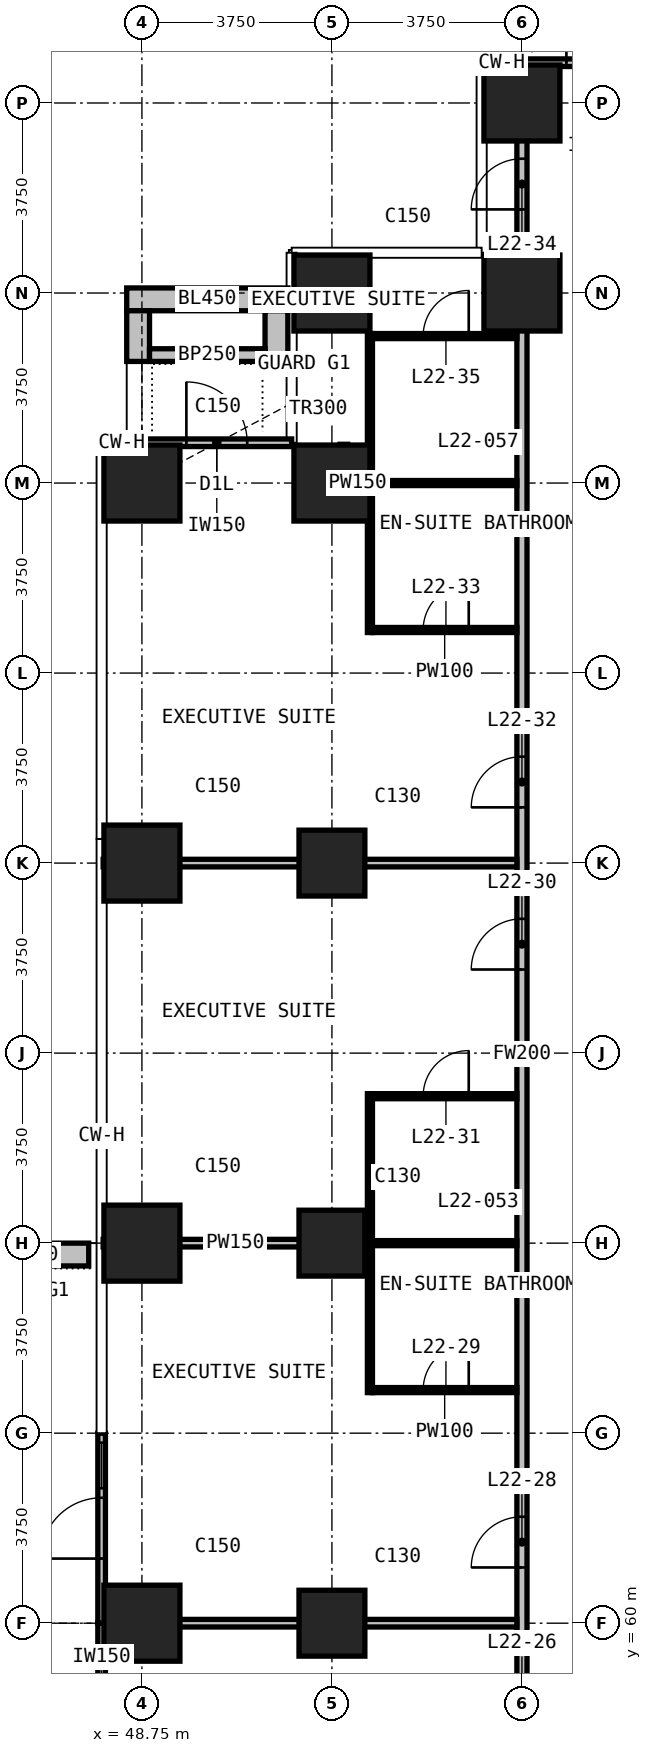
"""IFC4 building model, lengths in metres.
Left out: names, types, materials, properties, quantities, classifications, styles, units other than length and angle.
Written with IfcOpenShell. Run it as: python <this file> out.ifc"""

import sys

from ifc_helpers import new_model, si_unit, direction, frame, frame_2d, origin, origin_2d, place, context, subcontext, project, spatial, rectangle, extrude, element, fill, save


model = new_model("IFC4")
c1 = context("Model", 3, precision=1e-05, world=origin(), true_north=direction((0.0, 1.0)))
c2 = subcontext(c1, "Body", "Model", "MODEL_VIEW")
j1 = project(units=[si_unit("LENGTHUNIT", "METRE"), si_unit("PLANEANGLEUNIT", "RADIAN")], contexts=[c1])
p1 = place(None, origin())
s1 = spatial("IfcSite", under=j1, at=p1, CompositionType="ELEMENT")
p2 = place(p1, origin())
s2 = spatial("IfcBuilding", under=s1, at=p2, CompositionType="ELEMENT")
p3 = place(p2, frame((0.0, 0.0, 92.3)))
s3 = spatial("IfcBuildingStorey", under=s2, at=p3, CompositionType="ELEMENT", Elevation=92.3)
for number, where, z_axis, x_axis in (
    (1, (48.75, 60.0, 0.0), (0.0, 0.0, 1.0), (1.0, 0.0, 0.0)),
    (2, (48.75, 67.5, 0.0), (0.0, 0.0, 1.0), (1.0, 0.0, 0.0)),
    (3, (48.75, 75.0, 0.0), (0.0, 0.0, 1.0), (1.0, 0.0, 0.0)),
    (4, (48.75, 82.5, 0.0), (0.0, 0.0, 1.0), (1.0, 0.0, 0.0)),
):
    element("IfcColumn", number, at=place(p3, frame(where, z_axis=z_axis, x_axis=x_axis)), inside=s3, PredefinedType="COLUMN", context=c2, shape_type="SweptSolid", body=[
        extrude(rectangle(XDim=1.5, YDim=1.5, at=origin_2d()), origin(), (0.0, 0.0, 1.0), 3.3),
    ])
for number, where, z_axis, x_axis in (
    (5, (52.5, 60.0, 0.0), (0.0, 0.0, 1.0), (1.0, 0.0, 0.0)),
    (6, (52.5, 67.5, 0.0), (0.0, 0.0, 1.0), (1.0, 0.0, 0.0)),
    (7, (52.5, 75.0, 0.0), (0.0, 0.0, 1.0), (1.0, 0.0, 0.0)),
):
    element("IfcColumn", number, at=place(p3, frame(where, z_axis=z_axis, x_axis=x_axis)), inside=s3, PredefinedType="COLUMN", context=c2, shape_type="SweptSolid", body=[
        extrude(rectangle(XDim=1.3, YDim=1.3, at=origin_2d()), origin(), (0.0, 0.0, 1.0), 3.3),
    ])
for number, where, z_axis, x_axis in (
    (8, (52.5, 82.5, 0.0), (0.0, 0.0, 1.0), (1.0, 0.0, 0.0)),
    (9, (52.5, 86.25, 0.0), (0.0, 0.0, 1.0), (1.0, 0.0, 0.0)),
    (10, (56.25, 86.25, 0.0), (0.0, 0.0, 1.0), (1.0, 0.0, 0.0)),
    (11, (56.25, 90.0, 0.0), (0.0, 0.0, 1.0), (1.0, 0.0, 0.0)),
):
    element("IfcColumn", number, at=place(p3, frame(where, z_axis=z_axis, x_axis=x_axis)), inside=s3, PredefinedType="COLUMN", context=c2, shape_type="SweptSolid", body=[
        extrude(rectangle(XDim=1.5, YDim=1.5, at=origin_2d()), origin(), (0.0, 0.0, 1.0), 3.3),
    ])
p4 = place(p3, frame((56.25, 90.795, 0.0), z_axis=(0.0, 0.0, 1.0), x_axis=(1.0, 0.0, 0.0)))
e12 = element("IfcWall", 12, at=p4, inside=s3, PredefinedType="SOLIDWALL", context=c2, shape_type="SweptSolid", body=[
    extrude(rectangle(XDim=2.955, YDim=0.15, at=frame_2d((1.478, 0.0))), origin(), (0.0, 0.0, 1.0), 3.0),
])
p5 = place(p4, frame((0.877, 0.0, 0.0)))
e13 = element("IfcOpeningElement", 13, at=p5, cuts=e12, PredefinedType="OPENING", context=c2, shape_type="SweptSolid", body=[
    extrude(rectangle(XDim=1.2, YDim=2.4, at=frame_2d((0.6, 1.2))), frame((0.0, 0.085, 0.0), z_axis=(0.0, -1.0, 0.0), x_axis=(1.0, 0.0, 0.0)), (0.0, 0.0, 1.0), 0.17),
])
p6 = place(p3, frame((48.75, 83.295, 0.0), z_axis=(0.0, 0.0, 1.0), x_axis=(1.0, 0.0, 0.0)))
e14 = element("IfcWall", 14, at=p6, inside=s3, PredefinedType="SOLIDWALL", context=c2, shape_type="SweptSolid", body=[
    extrude(rectangle(XDim=2.955, YDim=0.15, at=frame_2d((1.478, 0.0))), origin(), (0.0, 0.0, 1.0), 3.0),
])
p7 = place(p6, frame((0.877, 0.0, 0.0)))
e15 = element("IfcOpeningElement", 15, at=p7, cuts=e14, PredefinedType="OPENING", context=c2, shape_type="SweptSolid", body=[
    extrude(rectangle(XDim=1.2, YDim=2.0, at=frame_2d((0.6, 1.0))), frame((0.0, 0.085, 0.0), z_axis=(0.0, -1.0, 0.0), x_axis=(1.0, 0.0, 0.0)), (0.0, 0.0, 1.0), 0.17),
])
p8 = place(p3, frame((47.955, 56.25, 0.0), z_axis=(0.0, 0.0, 1.0), x_axis=(0.0, 1.0, 0.0)))
e16 = element("IfcWall", 16, at=p8, inside=s3, PredefinedType="SOLIDWALL", context=c2, shape_type="SweptSolid", body=[
    extrude(rectangle(XDim=3.75, YDim=0.15, at=frame_2d((1.875, 0.0))), origin(), (0.0, 0.0, 1.0), 3.0),
])
p9 = place(p8, frame((0.188, 0.0, 0.1)))
e17 = element("IfcOpeningElement", 17, at=p9, cuts=e16, PredefinedType="OPENING", context=c2, shape_type="SweptSolid", body=[
    extrude(rectangle(XDim=0.9, YDim=2.4, at=frame_2d((0.45, 1.2))), frame((0.0, 0.085, 0.0), z_axis=(0.0, -1.0, 0.0), x_axis=(1.0, 0.0, 0.0)), (0.0, 0.0, 1.0), 0.17),
])
p10 = place(p8, frame((1.275, 0.0, 0.0)))
e18 = element("IfcOpeningElement", 18, at=p10, cuts=e16, PredefinedType="OPENING", context=c2, shape_type="SweptSolid", body=[
    extrude(rectangle(XDim=1.2, YDim=2.4, at=frame_2d((0.6, 1.2))), frame((0.0, 0.085, 0.0), z_axis=(0.0, -1.0, 0.0), x_axis=(1.0, 0.0, 0.0)), (0.0, 0.0, 1.0), 0.17),
])
p11 = place(p3, frame((47.955, 60.0, 0.0), z_axis=(0.0, 0.0, 1.0), x_axis=(0.0, 1.0, 0.0)))
e19 = element("IfcWall", 19, at=p11, inside=s3, PredefinedType="SOLIDWALL", context=c2, shape_type="SweptSolid", body=[
    extrude(rectangle(XDim=3.75, YDim=0.15, at=frame_2d((1.875, 0.0))), origin(), (0.0, 0.0, 1.0), 3.0),
])
p12 = place(p11, frame((1.275, 0.0, 0.0)))
e20 = element("IfcOpeningElement", 20, at=p12, cuts=e19, PredefinedType="OPENING", context=c2, shape_type="SweptSolid", body=[
    extrude(rectangle(XDim=1.2, YDim=2.4, at=frame_2d((0.6, 1.2))), frame((0.0, 0.085, 0.0), z_axis=(0.0, -1.0, 0.0), x_axis=(1.0, 0.0, 0.0)), (0.0, 0.0, 1.0), 0.17),
])
p13 = place(p11, frame((2.663, 0.0, 0.1)))
e21 = element("IfcOpeningElement", 21, at=p13, cuts=e19, PredefinedType="OPENING", context=c2, shape_type="SweptSolid", body=[
    extrude(rectangle(XDim=0.9, YDim=2.4, at=frame_2d((0.45, 1.2))), frame((0.0, 0.085, 0.0), z_axis=(0.0, -1.0, 0.0), x_axis=(1.0, 0.0, 0.0)), (0.0, 0.0, 1.0), 0.17),
])
p14 = place(p3, frame((48.45, 86.125, 0.0), z_axis=(0.0, 0.0, 1.0), x_axis=(1.0, 0.0, 0.0)))
e22 = element("IfcWall", 22, at=p14, inside=s3, PredefinedType="USERDEFINED", context=c2, shape_type="SweptSolid", body=[
    extrude(rectangle(XDim=3.18, YDim=0.45, at=frame_2d((1.59, 0.0))), origin(), (0.0, 0.0, 1.0), 1.1),
])
for number, where, z_axis, x_axis in (
    (23, (48.675, 84.9, 0.0), (0.0, 0.0, 1.0), (0.0, 1.0, 0.0)),
    (24, (51.405, 84.9, 0.0), (0.0, 0.0, 1.0), (0.0, 1.0, 0.0)),
):
    element("IfcWall", number, at=place(p3, frame(where, z_axis=z_axis, x_axis=x_axis)), inside=s3, PredefinedType="USERDEFINED", context=c2, shape_type="SweptSolid", body=[
        extrude(rectangle(XDim=1.0, YDim=0.45, at=frame_2d((0.5, 0.0))), origin(), (0.0, 0.0, 1.0), 1.1),
    ])
p15 = place(p3, frame((48.9, 85.025, 0.0), z_axis=(0.0, 0.0, 1.0), x_axis=(1.0, 0.0, 0.0)))
e25 = element("IfcWall", 25, at=p15, inside=s3, PredefinedType="USERDEFINED", context=c2, shape_type="SweptSolid", body=[
    extrude(rectangle(XDim=2.28, YDim=0.25, at=frame_2d((1.14, 0.0))), origin(), (0.0, 0.0, 1.0), 1.0),
])
p16 = place(p3, frame((47.7, 67.275, 0.0), z_axis=(0.0, 0.0, 1.0), x_axis=(-1.0, 0.0, 0.0)))
e26 = element("IfcWall", 26, at=p16, inside=s3, PredefinedType="USERDEFINED", context=c2, shape_type="SweptSolid", body=[
    extrude(rectangle(XDim=2.35, YDim=0.45, at=frame_2d((1.175, 0.0))), origin(), (0.0, 0.0, 1.0), 1.1),
])
p17 = place(p3, frame((56.25, 52.4, 0.0), z_axis=(0.0, 0.0, 1.0), x_axis=(0.0, 1.0, 0.0)))
e27 = element("IfcWall", 27, at=p17, inside=s3, PredefinedType="PARTITIONING", context=c2, shape_type="SweptSolid", body=[
    extrude(rectangle(XDim=37.675, YDim=0.2, at=frame_2d((18.837, 0.0))), origin(), (0.0, 0.0, 1.0), 3.0),
])
p18 = place(p17, frame((5.5, 0.0, 0.0)))
e28 = element("IfcOpeningElement", 28, at=p18, cuts=e27, PredefinedType="OPENING", context=c2, shape_type="SweptSolid", body=[
    extrude(rectangle(XDim=1.0, YDim=2.2, at=frame_2d((0.5, 1.1))), frame((0.0, 0.11, 0.0), z_axis=(0.0, -1.0, 0.0), x_axis=(1.0, 0.0, 0.0)), (0.0, 0.0, 1.0), 0.22),
])
p19 = place(p17, frame((8.7, 0.0, 0.0)))
e29 = element("IfcOpeningElement", 29, at=p19, cuts=e27, PredefinedType="OPENING", context=c2, shape_type="SweptSolid", body=[
    extrude(rectangle(XDim=1.0, YDim=2.2, at=frame_2d((0.5, 1.1))), frame((0.0, 0.11, 0.0), z_axis=(0.0, -1.0, 0.0), x_axis=(1.0, 0.0, 0.0)), (0.0, 0.0, 1.0), 0.22),
])
p20 = place(p17, frame((20.5, 0.0, 0.0)))
e30 = element("IfcOpeningElement", 30, at=p20, cuts=e27, PredefinedType="OPENING", context=c2, shape_type="SweptSolid", body=[
    extrude(rectangle(XDim=1.0, YDim=2.2, at=frame_2d((0.5, 1.1))), frame((0.0, 0.11, 0.0), z_axis=(0.0, -1.0, 0.0), x_axis=(1.0, 0.0, 0.0)), (0.0, 0.0, 1.0), 0.22),
])
p21 = place(p17, frame((23.7, 0.0, 0.0)))
e31 = element("IfcOpeningElement", 31, at=p21, cuts=e27, PredefinedType="OPENING", context=c2, shape_type="SweptSolid", body=[
    extrude(rectangle(XDim=1.0, YDim=2.2, at=frame_2d((0.5, 1.1))), frame((0.0, 0.11, 0.0), z_axis=(0.0, -1.0, 0.0), x_axis=(1.0, 0.0, 0.0)), (0.0, 0.0, 1.0), 0.22),
])
p22 = place(p17, frame((35.5, 0.0, 0.0)))
e32 = element("IfcOpeningElement", 32, at=p22, cuts=e27, PredefinedType="OPENING", context=c2, shape_type="SweptSolid", body=[
    extrude(rectangle(XDim=1.0, YDim=2.2, at=frame_2d((0.5, 1.1))), frame((0.0, 0.11, 0.0), z_axis=(0.0, -1.0, 0.0), x_axis=(1.0, 0.0, 0.0)), (0.0, 0.0, 1.0), 0.22),
])
p23 = place(p3, frame((56.25, 90.03, 0.0), z_axis=(0.0, 0.0, 1.0), x_axis=(0.0, 1.0, 0.0)))
e33 = element("IfcWall", 33, at=p23, inside=s3, PredefinedType="PARTITIONING", context=c2, shape_type="SweptSolid", body=[
    extrude(rectangle(XDim=0.615, YDim=0.2, at=frame_2d((0.308, 0.0))), origin(), (0.0, 0.0, 1.0), 3.0),
])
p24 = place(p3, frame((48.04, 60.0, 0.0), z_axis=(0.0, 0.0, 1.0), x_axis=(1.0, 0.0, 0.0)))
e34 = element("IfcWall", 34, at=p24, inside=s3, PredefinedType="PARTITIONING", context=c2, shape_type="SweptSolid", body=[
    extrude(rectangle(XDim=8.11, YDim=0.15, at=frame_2d((4.055, 0.0))), origin(), (0.0, 0.0, 1.0), 3.0),
])
p25 = place(p3, frame((47.985, 67.5, 0.0), z_axis=(0.0, 0.0, 1.0), x_axis=(1.0, 0.0, 0.0)))
e35 = element("IfcWall", 35, at=p25, inside=s3, PredefinedType="PARTITIONING", context=c2, shape_type="SweptSolid", body=[
    extrude(rectangle(XDim=5.215, YDim=0.15, at=frame_2d((2.607, 0.0))), origin(), (0.0, 0.0, 1.0), 3.0),
])
p26 = place(p3, frame((47.985, 75.0, 0.0), z_axis=(0.0, 0.0, 1.0), x_axis=(1.0, 0.0, 0.0)))
e36 = element("IfcWall", 36, at=p26, inside=s3, PredefinedType="PARTITIONING", context=c2, shape_type="SweptSolid", body=[
    extrude(rectangle(XDim=8.165, YDim=0.15, at=frame_2d((4.083, 0.0))), origin(), (0.0, 0.0, 1.0), 3.0),
])
p27 = place(p3, frame((52.81, 82.5, 0.0), z_axis=(0.0, 0.0, 1.0), x_axis=(1.0, 0.0, 0.0)))
e37 = element("IfcWall", 37, at=p27, inside=s3, PredefinedType="PARTITIONING", context=c2, shape_type="SweptSolid", body=[
    extrude(rectangle(XDim=0.39, YDim=0.15, at=frame_2d((0.195, 0.0))), origin(), (0.0, 0.0, 1.0), 3.0),
])
p28 = place(p3, frame((55.605, 90.0, 0.0), z_axis=(0.0, 0.0, 1.0), x_axis=(1.0, 0.0, 0.0)))
e38 = element("IfcWall", 38, at=p28, inside=s3, PredefinedType="PARTITIONING", context=c2, shape_type="SweptSolid", body=[
    extrude(rectangle(XDim=0.545, YDim=0.15, at=frame_2d((0.272, 0.0))), origin(), (0.0, 0.0, 1.0), 3.0),
])
p29 = place(p3, frame((52.735, 82.425, 0.0), z_axis=(0.0, 0.0, 1.0), x_axis=(0.0, 1.0, 0.0)))
e39 = element("IfcWall", 39, at=p29, inside=s3, PredefinedType="PARTITIONING", context=c2, shape_type="SweptSolid", body=[
    extrude(rectangle(XDim=0.84, YDim=0.15, at=frame_2d((0.42, 0.0))), origin(), (0.0, 0.0, 1.0), 3.0),
])
p30 = place(p3, frame((53.3, 64.6, 0.0), z_axis=(0.0, 0.0, 1.0), x_axis=(1.0, 0.0, 0.0)))
e40 = element("IfcWall", 40, at=p30, inside=s3, PredefinedType="PARTITIONING", context=c2, shape_type="SweptSolid", body=[
    extrude(rectangle(XDim=2.85, YDim=0.1, at=frame_2d((1.425, 0.0))), origin(), (0.0, 0.0, 1.0), 3.0),
])
p31 = place(p30, frame((1.0, 0.0, 0.0)))
e41 = element("IfcOpeningElement", 41, at=p31, cuts=e40, PredefinedType="OPENING", context=c2, shape_type="SweptSolid", body=[
    extrude(rectangle(XDim=0.9, YDim=2.2, at=frame_2d((0.45, 1.1))), frame((0.0, 0.06, 0.0), z_axis=(0.0, -1.0, 0.0), x_axis=(1.0, 0.0, 0.0)), (0.0, 0.0, 1.0), 0.12),
])
p32 = place(p3, frame((53.3, 67.5, 0.0), z_axis=(0.0, 0.0, 1.0), x_axis=(1.0, 0.0, 0.0)))
e42 = element("IfcWall", 42, at=p32, inside=s3, PredefinedType="PARTITIONING", context=c2, shape_type="SweptSolid", body=[
    extrude(rectangle(XDim=2.85, YDim=0.1, at=frame_2d((1.425, 0.0))), origin(), (0.0, 0.0, 1.0), 3.0),
])
p33 = place(p3, frame((53.3, 70.4, 0.0), z_axis=(0.0, 0.0, 1.0), x_axis=(1.0, 0.0, 0.0)))
e43 = element("IfcWall", 43, at=p33, inside=s3, PredefinedType="PARTITIONING", context=c2, shape_type="SweptSolid", body=[
    extrude(rectangle(XDim=2.85, YDim=0.1, at=frame_2d((1.425, 0.0))), origin(), (0.0, 0.0, 1.0), 3.0),
])
p34 = place(p33, frame((1.0, 0.0, 0.0)))
e44 = element("IfcOpeningElement", 44, at=p34, cuts=e43, PredefinedType="OPENING", context=c2, shape_type="SweptSolid", body=[
    extrude(rectangle(XDim=0.9, YDim=2.2, at=frame_2d((0.45, 1.1))), frame((0.0, 0.06, 0.0), z_axis=(0.0, -1.0, 0.0), x_axis=(1.0, 0.0, 0.0)), (0.0, 0.0, 1.0), 0.12),
])
p35 = place(p3, frame((53.3, 79.6, 0.0), z_axis=(0.0, 0.0, 1.0), x_axis=(1.0, 0.0, 0.0)))
e45 = element("IfcWall", 45, at=p35, inside=s3, PredefinedType="PARTITIONING", context=c2, shape_type="SweptSolid", body=[
    extrude(rectangle(XDim=2.85, YDim=0.1, at=frame_2d((1.425, 0.0))), origin(), (0.0, 0.0, 1.0), 3.0),
])
p36 = place(p35, frame((1.0, 0.0, 0.0)))
e46 = element("IfcOpeningElement", 46, at=p36, cuts=e45, PredefinedType="OPENING", context=c2, shape_type="SweptSolid", body=[
    extrude(rectangle(XDim=0.9, YDim=2.2, at=frame_2d((0.45, 1.1))), frame((0.0, 0.06, 0.0), z_axis=(0.0, -1.0, 0.0), x_axis=(1.0, 0.0, 0.0)), (0.0, 0.0, 1.0), 0.12),
])
p37 = place(p3, frame((53.3, 82.5, 0.0), z_axis=(0.0, 0.0, 1.0), x_axis=(1.0, 0.0, 0.0)))
e47 = element("IfcWall", 47, at=p37, inside=s3, PredefinedType="PARTITIONING", context=c2, shape_type="SweptSolid", body=[
    extrude(rectangle(XDim=2.85, YDim=0.1, at=frame_2d((1.425, 0.0))), origin(), (0.0, 0.0, 1.0), 3.0),
])
p38 = place(p3, frame((53.3, 85.4, 0.0), z_axis=(0.0, 0.0, 1.0), x_axis=(1.0, 0.0, 0.0)))
e48 = element("IfcWall", 48, at=p38, inside=s3, PredefinedType="PARTITIONING", context=c2, shape_type="SweptSolid", body=[
    extrude(rectangle(XDim=2.85, YDim=0.1, at=frame_2d((1.425, 0.0))), origin(), (0.0, 0.0, 1.0), 3.0),
])
p39 = place(p38, frame((1.0, 0.0, 0.0)))
e49 = element("IfcOpeningElement", 49, at=p39, cuts=e48, PredefinedType="OPENING", context=c2, shape_type="SweptSolid", body=[
    extrude(rectangle(XDim=0.9, YDim=2.2, at=frame_2d((0.45, 1.1))), frame((0.0, 0.06, 0.0), z_axis=(0.0, -1.0, 0.0), x_axis=(1.0, 0.0, 0.0)), (0.0, 0.0, 1.0), 0.12),
])
for number, where, z_axis, x_axis in (
    (50, (53.25, 64.55, 0.0), (0.0, 0.0, 1.0), (0.0, 1.0, 0.0)),
    (51, (53.25, 79.55, 0.0), (0.0, 0.0, 1.0), (0.0, 1.0, 0.0)),
):
    element("IfcWall", number, at=place(p3, frame(where, z_axis=z_axis, x_axis=x_axis)), inside=s3, PredefinedType="PARTITIONING", context=c2, shape_type="SweptSolid", body=[
        extrude(rectangle(XDim=5.9, YDim=0.1, at=frame_2d((2.95, 0.0))), origin(), (0.0, 0.0, 1.0), 3.0),
    ])
p40 = place(p5, origin())
e52 = element("IfcDoor", 52, at=p40, inside=s3, OperationType="SINGLE_SWING_LEFT", PredefinedType="DOOR", context=c2, shape_type="SweptSolid", body=[
    extrude(rectangle(XDim=1.2, YDim=2.4, at=frame_2d((0.6, 1.2))), frame((0.0, 0.025, 0.0), z_axis=(0.0, -1.0, 0.0), x_axis=(1.0, 0.0, 0.0)), (0.0, 0.0, 1.0), 0.05),
])
fill(e13, e52)
p41 = place(p7, origin())
e53 = element("IfcDoor", 53, at=p41, inside=s3, OperationType="SINGLE_SWING_LEFT", PredefinedType="DOOR", context=c2, shape_type="SweptSolid", body=[
    extrude(rectangle(XDim=1.2, YDim=2.0, at=frame_2d((0.6, 1.0))), frame((0.0, 0.025, 0.0), z_axis=(0.0, -1.0, 0.0), x_axis=(1.0, 0.0, 0.0)), (0.0, 0.0, 1.0), 0.05),
])
fill(e15, e53)
p42 = place(p12, origin())
e54 = element("IfcDoor", 54, at=p42, inside=s3, OperationType="SINGLE_SWING_LEFT", PredefinedType="DOOR", context=c2, shape_type="SweptSolid", body=[
    extrude(rectangle(XDim=1.2, YDim=2.4, at=frame_2d((0.6, 1.2))), frame((0.0, 0.025, 0.0), z_axis=(0.0, -1.0, 0.0), x_axis=(1.0, 0.0, 0.0)), (0.0, 0.0, 1.0), 0.05),
])
fill(e20, e54)
p43 = place(p13, origin())
e55 = element("IfcWindow", 55, at=p43, inside=s3, PartitioningType="SINGLE_PANEL", PredefinedType="WINDOW", context=c2, shape_type="SweptSolid", body=[
    extrude(rectangle(XDim=0.9, YDim=2.4, at=frame_2d((0.45, 1.2))), frame((0.0, 0.03, 0.0), z_axis=(0.0, -1.0, 0.0), x_axis=(1.0, 0.0, 0.0)), (0.0, 0.0, 1.0), 0.06),
])
fill(e21, e55)
p44 = place(p19, origin())
e56 = element("IfcDoor", 56, at=p44, inside=s3, OperationType="SINGLE_SWING_RIGHT", PredefinedType="DOOR", context=c2, shape_type="SweptSolid", body=[
    extrude(rectangle(XDim=1.0, YDim=2.2, at=frame_2d((0.5, 1.1))), frame((0.0, 0.025, 0.0), z_axis=(0.0, -1.0, 0.0), x_axis=(1.0, 0.0, 0.0)), (0.0, 0.0, 1.0), 0.05),
])
fill(e29, e56)
p45 = place(p31, origin())
e57 = element("IfcDoor", 57, at=p45, inside=s3, OperationType="SINGLE_SWING_RIGHT", PredefinedType="DOOR", context=c2, shape_type="SweptSolid", body=[
    extrude(rectangle(XDim=0.9, YDim=2.2, at=frame_2d((0.45, 1.1))), frame((0.0, 0.025, 0.0), z_axis=(0.0, -1.0, 0.0), x_axis=(1.0, 0.0, 0.0)), (0.0, 0.0, 1.0), 0.05),
])
fill(e41, e57)
p46 = place(p20, origin())
e58 = element("IfcDoor", 58, at=p46, inside=s3, OperationType="SINGLE_SWING_LEFT", PredefinedType="DOOR", context=c2, shape_type="SweptSolid", body=[
    extrude(rectangle(XDim=1.0, YDim=2.2, at=frame_2d((0.5, 1.1))), frame((0.0, 0.025, 0.0), z_axis=(0.0, -1.0, 0.0), x_axis=(1.0, 0.0, 0.0)), (0.0, 0.0, 1.0), 0.05),
])
fill(e30, e58)
p47 = place(p34, origin())
e59 = element("IfcDoor", 59, at=p47, inside=s3, OperationType="SINGLE_SWING_RIGHT", PredefinedType="DOOR", context=c2, shape_type="SweptSolid", body=[
    extrude(rectangle(XDim=0.9, YDim=2.2, at=frame_2d((0.45, 1.1))), frame((0.0, 0.025, 0.0), z_axis=(0.0, -1.0, 0.0), x_axis=(1.0, 0.0, 0.0)), (0.0, 0.0, 1.0), 0.05),
])
fill(e44, e59)
p48 = place(p21, origin())
e60 = element("IfcDoor", 60, at=p48, inside=s3, OperationType="SINGLE_SWING_RIGHT", PredefinedType="DOOR", context=c2, shape_type="SweptSolid", body=[
    extrude(rectangle(XDim=1.0, YDim=2.2, at=frame_2d((0.5, 1.1))), frame((0.0, 0.025, 0.0), z_axis=(0.0, -1.0, 0.0), x_axis=(1.0, 0.0, 0.0)), (0.0, 0.0, 1.0), 0.05),
])
fill(e31, e60)
p49 = place(p36, origin())
e61 = element("IfcDoor", 61, at=p49, inside=s3, OperationType="SINGLE_SWING_RIGHT", PredefinedType="DOOR", context=c2, shape_type="SweptSolid", body=[
    extrude(rectangle(XDim=0.9, YDim=2.2, at=frame_2d((0.45, 1.1))), frame((0.0, 0.025, 0.0), z_axis=(0.0, -1.0, 0.0), x_axis=(1.0, 0.0, 0.0)), (0.0, 0.0, 1.0), 0.05),
])
fill(e46, e61)
p50 = place(p22, origin())
e62 = element("IfcDoor", 62, at=p50, inside=s3, OperationType="SINGLE_SWING_RIGHT", PredefinedType="DOOR", context=c2, shape_type="SweptSolid", body=[
    extrude(rectangle(XDim=1.0, YDim=2.2, at=frame_2d((0.5, 1.1))), frame((0.0, 0.025, 0.0), z_axis=(0.0, -1.0, 0.0), x_axis=(1.0, 0.0, 0.0)), (0.0, 0.0, 1.0), 0.05),
])
fill(e32, e62)
p51 = place(p39, origin())
e63 = element("IfcDoor", 63, at=p51, inside=s3, OperationType="SINGLE_SWING_RIGHT", PredefinedType="DOOR", context=c2, shape_type="SweptSolid", body=[
    extrude(rectangle(XDim=0.9, YDim=2.2, at=frame_2d((0.45, 1.1))), frame((0.0, 0.025, 0.0), z_axis=(0.0, -1.0, 0.0), x_axis=(1.0, 0.0, 0.0)), (0.0, 0.0, 1.0), 0.05),
])
fill(e49, e63)
save(model, sys.argv[1])
